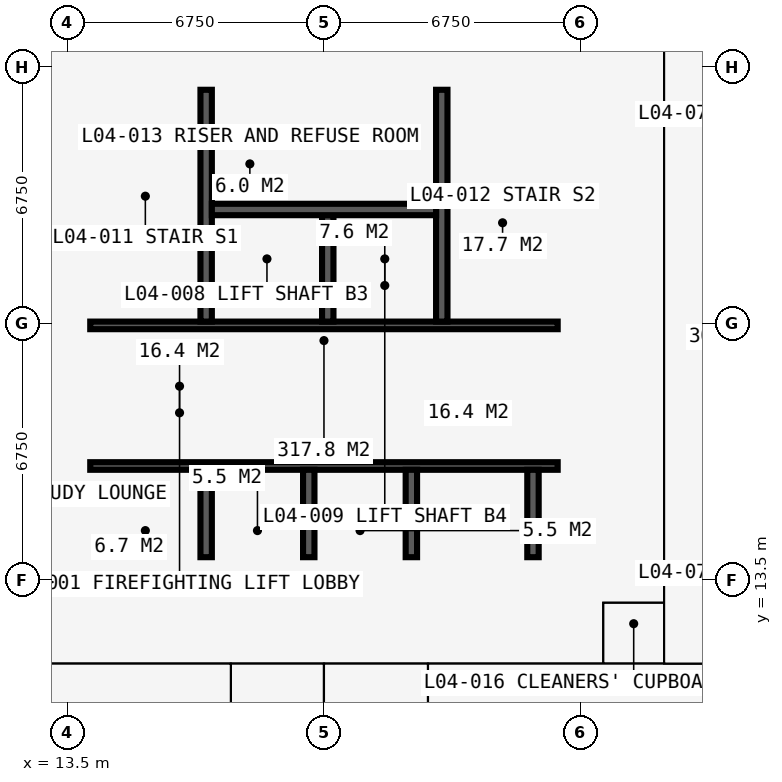
"""IFC4 building model, lengths in metres.
Left out: names, types, materials, properties, quantities, classifications, styles, units other than length and angle.
Written with IfcOpenShell. Run it as: python <this file> out.ifc"""

import sys

from ifc_helpers import new_model, si_unit, direction, frame, frame_2d, origin, place, context, subcontext, project, spatial, rectangle, extrude, element, fill, save


model = new_model("IFC4")
c1 = context("Model", 3, precision=1e-05, world=origin(), true_north=direction((0.0, 1.0)))
c2 = subcontext(c1, "Body", "Model", "MODEL_VIEW")
j1 = project(units=[si_unit("LENGTHUNIT", "METRE"), si_unit("PLANEANGLEUNIT", "RADIAN")], contexts=[c1])
p1 = place(None, origin())
s1 = spatial("IfcSite", under=j1, at=p1, CompositionType="ELEMENT")
p2 = place(p1, origin())
s2 = spatial("IfcBuilding", under=s1, at=p2, CompositionType="ELEMENT")
p3 = place(p2, frame((0.0, 0.0, 18.0)))
s3 = spatial("IfcBuildingStorey", under=s2, at=p3, CompositionType="ELEMENT", Elevation=18.0)
p4 = place(p3, frame((12.9, 13.5, 0.0), z_axis=(0.0, 0.0, 1.0), x_axis=(1.0, 0.0, 0.0)))
e1 = element("IfcWall", 1, at=p4, inside=s3, PredefinedType="SHEAR", context=c2, shape_type="SweptSolid", body=[
    extrude(rectangle(XDim=14.7, YDim=1.2, at=frame_2d((7.35, 0.0))), origin(), (0.0, 0.0, 1.0), 3.6),
])
p5 = place(p3, frame((27.0, 14.1, 0.0), z_axis=(0.0, 0.0, 1.0), x_axis=(0.0, 1.0, 0.0)))
e2 = element("IfcWall", 2, at=p5, inside=s3, PredefinedType="SHEAR", context=c2, shape_type="SweptSolid", body=[
    extrude(rectangle(XDim=12.3, YDim=1.2, at=frame_2d((6.15, 0.0))), origin(), (0.0, 0.0, 1.0), 3.6),
])
p6 = place(p5, frame((3.65, 0.0, 0.0)))
e3 = element("IfcOpeningElement", 3, at=p6, cuts=e2, PredefinedType="OPENING", context=c2, shape_type="SweptSolid", body=[
    extrude(rectangle(XDim=1.2, YDim=2.2, at=frame_2d((0.6, 1.1))), frame((0.0, 0.61, 0.0), z_axis=(0.0, -1.0, 0.0), x_axis=(1.0, 0.0, 0.0)), (0.0, 0.0, 1.0), 1.22),
])
p7 = place(p3, frame((27.6, 27.0, 0.0), z_axis=(0.0, 0.0, 1.0), x_axis=(-1.0, 0.0, 0.0)))
e4 = element("IfcWall", 4, at=p7, inside=s3, PredefinedType="SHEAR", context=c2, shape_type="SweptSolid", body=[
    extrude(rectangle(XDim=14.7, YDim=1.2, at=frame_2d((7.35, 0.0))), origin(), (0.0, 0.0, 1.0), 3.6),
])
p8 = place(p7, frame((5.225, 0.0, 0.0)))
e5 = element("IfcOpeningElement", 5, at=p8, cuts=e4, PredefinedType="OPENING", context=c2, shape_type="SweptSolid", body=[
    extrude(rectangle(XDim=0.9, YDim=2.2, at=frame_2d((0.45, 1.1))), frame((0.0, 0.61, 0.0), z_axis=(0.0, -1.0, 0.0), x_axis=(1.0, 0.0, 0.0)), (0.0, 0.0, 1.0), 1.22),
])
p9 = place(p7, frame((8.2, 0.0, 0.0)))
e6 = element("IfcOpeningElement", 6, at=p9, cuts=e4, PredefinedType="OPENING", context=c2, shape_type="SweptSolid", body=[
    extrude(rectangle(XDim=1.0, YDim=2.2, at=frame_2d((0.5, 1.1))), frame((0.0, 0.61, 0.0), z_axis=(0.0, -1.0, 0.0), x_axis=(1.0, 0.0, 0.0)), (0.0, 0.0, 1.0), 1.22),
])
p10 = place(p3, frame((13.5, 26.4, 0.0), z_axis=(0.0, 0.0, 1.0), x_axis=(0.0, -1.0, 0.0)))
e7 = element("IfcWall", 7, at=p10, inside=s3, PredefinedType="SHEAR", context=c2, shape_type="SweptSolid", body=[
    extrude(rectangle(XDim=12.3, YDim=1.2, at=frame_2d((6.15, 0.0))), origin(), (0.0, 0.0, 1.0), 3.6),
])
p11 = place(p10, frame((7.45, 0.0, 0.0)))
e8 = element("IfcOpeningElement", 8, at=p11, cuts=e7, PredefinedType="OPENING", context=c2, shape_type="SweptSolid", body=[
    extrude(rectangle(XDim=1.2, YDim=2.2, at=frame_2d((0.6, 1.1))), frame((0.0, 0.61, 0.0), z_axis=(0.0, -1.0, 0.0), x_axis=(1.0, 0.0, 0.0)), (0.0, 0.0, 1.0), 1.22),
])
p12 = place(p3, frame((14.1, 16.5, 0.0), z_axis=(0.0, 0.0, 1.0), x_axis=(1.0, 0.0, 0.0)))
e9 = element("IfcWall", 9, at=p12, inside=s3, PredefinedType="SHEAR", context=c2, shape_type="SweptSolid", body=[
    extrude(rectangle(XDim=12.3, YDim=0.2, at=frame_2d((6.15, 0.0))), origin(), (0.0, 0.0, 1.0), 3.6),
])
p13 = place(p12, frame((0.9, 0.0, 0.0)))
e10 = element("IfcOpeningElement", 10, at=p13, cuts=e9, PredefinedType="OPENING", context=c2, shape_type="SweptSolid", body=[
    extrude(rectangle(XDim=1.1, YDim=2.2, at=frame_2d((0.55, 1.1))), frame((0.0, 0.11, 0.0), z_axis=(0.0, -1.0, 0.0), x_axis=(1.0, 0.0, 0.0)), (0.0, 0.0, 1.0), 0.22),
])
p14 = place(p12, frame((9.5, 0.0, 0.0)))
e11 = element("IfcOpeningElement", 11, at=p14, cuts=e9, PredefinedType="OPENING", context=c2, shape_type="SweptSolid", body=[
    extrude(rectangle(XDim=1.1, YDim=2.2, at=frame_2d((0.55, 1.1))), frame((0.0, 0.11, 0.0), z_axis=(0.0, -1.0, 0.0), x_axis=(1.0, 0.0, 0.0)), (0.0, 0.0, 1.0), 0.22),
])
p15 = place(p3, frame((14.1, 20.2, 0.0), z_axis=(0.0, 0.0, 1.0), x_axis=(1.0, 0.0, 0.0)))
e12 = element("IfcWall", 12, at=p15, inside=s3, PredefinedType="SHEAR", context=c2, shape_type="SweptSolid", body=[
    extrude(rectangle(XDim=12.3, YDim=0.2, at=frame_2d((6.15, 0.0))), origin(), (0.0, 0.0, 1.0), 3.6),
])
p16 = place(p15, frame((0.35, 0.0, 0.0)))
e13 = element("IfcOpeningElement", 13, at=p16, cuts=e12, PredefinedType="OPENING", context=c2, shape_type="SweptSolid", body=[
    extrude(rectangle(XDim=1.1, YDim=2.2, at=frame_2d((0.55, 1.1))), frame((0.0, 0.11, 0.0), z_axis=(0.0, -1.0, 0.0), x_axis=(1.0, 0.0, 0.0)), (0.0, 0.0, 1.0), 0.22),
])
p17 = place(p15, frame((9.75, 0.0, 0.0)))
e14 = element("IfcOpeningElement", 14, at=p17, cuts=e12, PredefinedType="OPENING", context=c2, shape_type="SweptSolid", body=[
    extrude(rectangle(XDim=1.1, YDim=2.2, at=frame_2d((0.55, 1.1))), frame((0.0, 0.11, 0.0), z_axis=(0.0, -1.0, 0.0), x_axis=(1.0, 0.0, 0.0)), (0.0, 0.0, 1.0), 0.22),
])
for number, where, z_axis, x_axis in (
    (15, (17.15, 20.3, 0.0), (0.0, 0.0, 1.0), (0.0, 1.0, 0.0)),
    (16, (23.35, 20.3, 0.0), (0.0, 0.0, 1.0), (0.0, 1.0, 0.0)),
):
    element("IfcWall", number, at=place(p3, frame(where, z_axis=z_axis, x_axis=x_axis)), inside=s3, PredefinedType="SHEAR", context=c2, shape_type="SweptSolid", body=[
        extrude(rectangle(XDim=6.1, YDim=0.3, at=frame_2d((3.05, 0.0))), origin(), (0.0, 0.0, 1.0), 3.6),
    ])
p18 = place(p3, frame((20.35, 20.3, 0.0), z_axis=(0.0, 0.0, 1.0), x_axis=(0.0, 1.0, 0.0)))
e17 = element("IfcWall", 17, at=p18, inside=s3, PredefinedType="SHEAR", context=c2, shape_type="SweptSolid", body=[
    extrude(rectangle(XDim=2.8, YDim=0.3, at=frame_2d((1.4, 0.0))), origin(), (0.0, 0.0, 1.0), 3.6),
])
p19 = place(p3, frame((17.3, 23.25, 0.0), z_axis=(0.0, 0.0, 1.0), x_axis=(1.0, 0.0, 0.0)))
e18 = element("IfcWall", 18, at=p19, inside=s3, PredefinedType="SHEAR", context=c2, shape_type="SweptSolid", body=[
    extrude(rectangle(XDim=5.9, YDim=0.3, at=frame_2d((2.95, 0.0))), origin(), (0.0, 0.0, 1.0), 3.6),
])
for number, where, z_axis, x_axis in (
    (19, (17.15, 14.1, 0.0), (0.0, 0.0, 1.0), (0.0, 1.0, 0.0)),
    (20, (19.85, 14.1, 0.0), (0.0, 0.0, 1.0), (0.0, 1.0, 0.0)),
    (21, (22.55, 14.1, 0.0), (0.0, 0.0, 1.0), (0.0, 1.0, 0.0)),
    (22, (25.75, 14.1, 0.0), (0.0, 0.0, 1.0), (0.0, 1.0, 0.0)),
):
    element("IfcWall", number, at=place(p3, frame(where, z_axis=z_axis, x_axis=x_axis)), inside=s3, PredefinedType="SHEAR", context=c2, shape_type="SweptSolid", body=[
        extrude(rectangle(XDim=2.3, YDim=0.3, at=frame_2d((1.15, 0.0))), origin(), (0.0, 0.0, 1.0), 3.6),
    ])
p20 = place(p3, frame((18.875, 16.6, 0.0), z_axis=(0.0, 0.0, 1.0), x_axis=(0.0, 1.0, 0.0)))
e23 = element("IfcWall", 23, at=p20, inside=s3, PredefinedType="PARTITIONING", context=c2, shape_type="SweptSolid", body=[
    extrude(rectangle(XDim=3.5, YDim=0.15, at=frame_2d((1.75, 0.0))), origin(), (0.0, 0.0, 1.0), 3.375),
])
p21 = place(p20, frame((1.15, 0.0, 0.0)))
e24 = element("IfcOpeningElement", 24, at=p21, cuts=e23, PredefinedType="OPENING", context=c2, shape_type="SweptSolid", body=[
    extrude(rectangle(XDim=1.2, YDim=2.2, at=frame_2d((0.6, 1.1))), frame((0.0, 0.085, 0.0), z_axis=(0.0, -1.0, 0.0), x_axis=(1.0, 0.0, 0.0)), (0.0, 0.0, 1.0), 0.17),
])
p22 = place(p3, frame((21.625, 16.6, 0.0), z_axis=(0.0, 0.0, 1.0), x_axis=(0.0, 1.0, 0.0)))
e25 = element("IfcWall", 25, at=p22, inside=s3, PredefinedType="PARTITIONING", context=c2, shape_type="SweptSolid", body=[
    extrude(rectangle(XDim=3.5, YDim=0.15, at=frame_2d((1.75, 0.0))), origin(), (0.0, 0.0, 1.0), 3.375),
])
p23 = place(p22, frame((1.15, 0.0, 0.0)))
e26 = element("IfcOpeningElement", 26, at=p23, cuts=e25, PredefinedType="OPENING", context=c2, shape_type="SweptSolid", body=[
    extrude(rectangle(XDim=1.2, YDim=2.2, at=frame_2d((0.6, 1.1))), frame((0.0, 0.085, 0.0), z_axis=(0.0, -1.0, 0.0), x_axis=(1.0, 0.0, 0.0)), (0.0, 0.0, 1.0), 0.17),
])
p24 = place(p3, frame((19.375, 23.4, 0.0), z_axis=(0.0, 0.0, 1.0), x_axis=(0.0, 1.0, 0.0)))
e27 = element("IfcWall", 27, at=p24, inside=s3, PredefinedType="PARTITIONING", context=c2, shape_type="SweptSolid", body=[
    extrude(rectangle(XDim=3.0, YDim=0.15, at=frame_2d((1.5, 0.0))), origin(), (0.0, 0.0, 1.0), 3.375),
])
p25 = place(p3, frame((10.125, 11.3, 0.0), z_axis=(0.0, 0.0, 1.0), x_axis=(1.0, 0.0, 0.0)))
e28 = element("IfcWall", 28, at=p25, inside=s3, PredefinedType="PARTITIONING", context=c2, shape_type="SweptSolid", body=[
    extrude(rectangle(XDim=20.675, YDim=0.15, at=frame_2d((10.337, 0.0))), origin(), (0.0, 0.0, 1.0), 3.375),
])
p26 = place(p25, frame((8.375, 0.0, 0.0)))
e29 = element("IfcOpeningElement", 29, at=p26, cuts=e28, PredefinedType="OPENING", context=c2, shape_type="SweptSolid", body=[
    extrude(rectangle(XDim=1.0, YDim=2.2, at=frame_2d((0.5, 1.1))), frame((0.0, 0.085, 0.0), z_axis=(0.0, -1.0, 0.0), x_axis=(1.0, 0.0, 0.0)), (0.0, 0.0, 1.0), 0.17),
])
p27 = place(p25, frame((10.975, 0.0, 0.0)))
e30 = element("IfcOpeningElement", 30, at=p27, cuts=e28, PredefinedType="OPENING", context=c2, shape_type="SweptSolid", body=[
    extrude(rectangle(XDim=1.0, YDim=2.2, at=frame_2d((0.5, 1.1))), frame((0.0, 0.085, 0.0), z_axis=(0.0, -1.0, 0.0), x_axis=(1.0, 0.0, 0.0)), (0.0, 0.0, 1.0), 0.17),
])
p28 = place(p25, frame((3.925, 0.0, 0.0)))
e31 = element("IfcOpeningElement", 31, at=p28, cuts=e28, PredefinedType="OPENING", context=c2, shape_type="SweptSolid", body=[
    extrude(rectangle(XDim=0.95, YDim=2.2, at=frame_2d((0.475, 1.1))), frame((0.0, 0.085, 0.0), z_axis=(0.0, -1.0, 0.0), x_axis=(1.0, 0.0, 0.0)), (0.0, 0.0, 1.0), 0.17),
])
p29 = place(p3, frame((17.8, 5.65, 0.0), z_axis=(0.0, 0.0, 1.0), x_axis=(0.0, 1.0, 0.0)))
e32 = element("IfcWall", 32, at=p29, inside=s3, PredefinedType="PARTITIONING", context=c2, shape_type="SweptSolid", body=[
    extrude(rectangle(XDim=5.65, YDim=0.15, at=frame_2d((2.825, 0.0))), origin(), (0.0, 0.0, 1.0), 3.375),
])
p30 = place(p3, frame((20.25, -0.734, 0.0), z_axis=(0.0, 0.0, 1.0), x_axis=(0.0, 1.0, 0.0)))
e33 = element("IfcWall", 33, at=p30, inside=s3, PredefinedType="PARTITIONING", context=c2, shape_type="SweptSolid", body=[
    extrude(rectangle(XDim=12.034, YDim=0.15, at=frame_2d((6.017, 0.0))), origin(), (0.0, 0.0, 1.0), 2.61),
])
p31 = place(p3, frame((22.988, 5.65, 0.0), z_axis=(0.0, 0.0, 1.0), x_axis=(0.0, 1.0, 0.0)))
e34 = element("IfcWall", 34, at=p31, inside=s3, PredefinedType="PARTITIONING", context=c2, shape_type="SweptSolid", body=[
    extrude(rectangle(XDim=5.65, YDim=0.15, at=frame_2d((2.825, 0.0))), origin(), (0.0, 0.0, 1.0), 3.375),
])
p32 = place(p3, frame((27.6, 11.3, 0.0), z_axis=(0.0, 0.0, 1.0), x_axis=(0.0, 1.0, 0.0)))
e35 = element("IfcWall", 35, at=p32, inside=s3, PredefinedType="PARTITIONING", context=c2, shape_type="SweptSolid", body=[
    extrude(rectangle(XDim=1.6, YDim=0.15, at=frame_2d((0.8, 0.0))), origin(), (0.0, 0.0, 1.0), 3.375),
])
p33 = place(p32, frame((0.3, 0.0, 0.0)))
e36 = element("IfcOpeningElement", 36, at=p33, cuts=e35, PredefinedType="OPENING", context=c2, shape_type="SweptSolid", body=[
    extrude(rectangle(XDim=0.95, YDim=2.2, at=frame_2d((0.475, 1.1))), frame((0.0, 0.085, 0.0), z_axis=(0.0, -1.0, 0.0), x_axis=(1.0, 0.0, 0.0)), (0.0, 0.0, 1.0), 0.17),
])
p34 = place(p3, frame((27.6, 12.9, 0.0), z_axis=(0.0, 0.0, 1.0), x_axis=(1.0, 0.0, 0.0)))
e37 = element("IfcWall", 37, at=p34, inside=s3, PredefinedType="PARTITIONING", context=c2, shape_type="SweptSolid", body=[
    extrude(rectangle(XDim=1.6, YDim=0.15, at=frame_2d((0.8, 0.0))), origin(), (0.0, 0.0, 1.0), 2.877),
])
p35 = place(p3, frame((29.2, 11.3, 0.0), z_axis=(0.0, 0.0, 1.0), x_axis=(0.0, 1.0, 0.0)))
e38 = element("IfcWall", 38, at=p35, inside=s3, PredefinedType="PARTITIONING", context=c2, shape_type="SweptSolid", body=[
    extrude(rectangle(XDim=17.9, YDim=0.2, at=frame_2d((8.95, 0.0))), origin(), (0.0, 0.0, 1.0), 3.375),
])
p36 = place(p35, frame((8.35, 0.0, 0.0)))
e39 = element("IfcOpeningElement", 39, at=p36, cuts=e38, PredefinedType="OPENING", context=c2, shape_type="SweptSolid", body=[
    extrude(rectangle(XDim=1.2, YDim=2.2, at=frame_2d((0.6, 1.1))), frame((0.0, 0.11, 0.0), z_axis=(0.0, -1.0, 0.0), x_axis=(1.0, 0.0, 0.0)), (0.0, 0.0, 1.0), 0.22),
])
p37 = place(p3, frame((29.2, 25.7, 0.0), z_axis=(0.0, 0.0, 1.0), x_axis=(1.0, 0.0, 0.0)))
e40 = element("IfcWall", 40, at=p37, inside=s3, PredefinedType="SHEAR", context=c2, shape_type="SweptSolid", body=[
    extrude(rectangle(XDim=3.45, YDim=0.1, at=frame_2d((1.725, 0.0))), origin(), (0.0, 0.0, 1.0), 3.375),
])
p38 = place(p13, origin())
e41 = element("IfcDoor", 41, at=p38, inside=s3, OperationType="DOUBLE_DOOR_SLIDING", PredefinedType="DOOR", context=c2, shape_type="SweptSolid", body=[
    extrude(rectangle(XDim=1.1, YDim=2.2, at=frame_2d((0.55, 1.1))), frame((0.0, 0.025, 0.0), z_axis=(0.0, -1.0, 0.0), x_axis=(1.0, 0.0, 0.0)), (0.0, 0.0, 1.0), 0.05),
])
fill(e10, e41)
p39 = place(p14, origin())
e42 = element("IfcDoor", 42, at=p39, inside=s3, OperationType="DOUBLE_DOOR_SLIDING", PredefinedType="DOOR", context=c2, shape_type="SweptSolid", body=[
    extrude(rectangle(XDim=1.1, YDim=2.2, at=frame_2d((0.55, 1.1))), frame((0.0, 0.025, 0.0), z_axis=(0.0, -1.0, 0.0), x_axis=(1.0, 0.0, 0.0)), (0.0, 0.0, 1.0), 0.05),
])
fill(e11, e42)
p40 = place(p11, origin())
e43 = element("IfcDoor", 43, at=p40, inside=s3, OperationType="DOUBLE_DOOR_SINGLE_SWING", PredefinedType="DOOR", context=c2, shape_type="SweptSolid", body=[
    extrude(rectangle(XDim=1.2, YDim=2.2, at=frame_2d((0.6, 1.1))), frame((0.0, 0.025, 0.0), z_axis=(0.0, -1.0, 0.0), x_axis=(1.0, 0.0, 0.0)), (0.0, 0.0, 1.0), 0.05),
])
fill(e8, e43)
p41 = place(p6, origin())
e44 = element("IfcDoor", 44, at=p41, inside=s3, OperationType="DOUBLE_DOOR_SINGLE_SWING", PredefinedType="DOOR", context=c2, shape_type="SweptSolid", body=[
    extrude(rectangle(XDim=1.2, YDim=2.2, at=frame_2d((0.6, 1.1))), frame((0.0, 0.025, 0.0), z_axis=(0.0, -1.0, 0.0), x_axis=(1.0, 0.0, 0.0)), (0.0, 0.0, 1.0), 0.05),
])
fill(e3, e44)
p42 = place(p21, origin())
e45 = element("IfcDoor", 45, at=p42, inside=s3, OperationType="DOUBLE_DOOR_SINGLE_SWING", PredefinedType="DOOR", context=c2, shape_type="SweptSolid", body=[
    extrude(rectangle(XDim=1.2, YDim=2.2, at=frame_2d((0.6, 1.1))), frame((0.0, 0.025, 0.0), z_axis=(0.0, -1.0, 0.0), x_axis=(1.0, 0.0, 0.0)), (0.0, 0.0, 1.0), 0.05),
])
fill(e24, e45)
p43 = place(p23, origin())
e46 = element("IfcDoor", 46, at=p43, inside=s3, OperationType="DOUBLE_DOOR_SINGLE_SWING", PredefinedType="DOOR", context=c2, shape_type="SweptSolid", body=[
    extrude(rectangle(XDim=1.2, YDim=2.2, at=frame_2d((0.6, 1.1))), frame((0.0, 0.025, 0.0), z_axis=(0.0, -1.0, 0.0), x_axis=(1.0, 0.0, 0.0)), (0.0, 0.0, 1.0), 0.05),
])
fill(e26, e46)
p44 = place(p8, origin())
e47 = element("IfcDoor", 47, at=p44, inside=s3, OperationType="SINGLE_SWING_LEFT", PredefinedType="DOOR", context=c2, shape_type="SweptSolid", body=[
    extrude(rectangle(XDim=0.9, YDim=2.2, at=frame_2d((0.45, 1.1))), frame((0.0, 0.4, 0.0), z_axis=(0.0, -1.0, 0.0), x_axis=(1.0, 0.0, 0.0)), (0.0, 0.0, 1.0), 0.8),
])
fill(e5, e47)
p45 = place(p9, origin())
e48 = element("IfcDoor", 48, at=p45, inside=s3, OperationType="SINGLE_SWING_LEFT", PredefinedType="DOOR", context=c2, shape_type="SweptSolid", body=[
    extrude(rectangle(XDim=1.0, YDim=2.2, at=frame_2d((0.5, 1.1))), frame((0.0, 0.025, 0.0), z_axis=(0.0, -1.0, 0.0), x_axis=(1.0, 0.0, 0.0)), (0.0, 0.0, 1.0), 0.05),
])
fill(e6, e48)
p46 = place(p16, origin())
e49 = element("IfcDoor", 49, at=p46, inside=s3, OperationType="SINGLE_SWING_LEFT", PredefinedType="DOOR", context=c2, shape_type="SweptSolid", body=[
    extrude(rectangle(XDim=1.1, YDim=2.2, at=frame_2d((0.55, 1.1))), frame((0.0, 0.025, 0.0), z_axis=(0.0, -1.0, 0.0), x_axis=(1.0, 0.0, 0.0)), (0.0, 0.0, 1.0), 0.05),
])
fill(e13, e49)
p47 = place(p17, origin())
e50 = element("IfcDoor", 50, at=p47, inside=s3, OperationType="SINGLE_SWING_LEFT", PredefinedType="DOOR", context=c2, shape_type="SweptSolid", body=[
    extrude(rectangle(XDim=1.1, YDim=2.2, at=frame_2d((0.55, 1.1))), frame((0.0, 0.025, 0.0), z_axis=(0.0, -1.0, 0.0), x_axis=(1.0, 0.0, 0.0)), (0.0, 0.0, 1.0), 0.05),
])
fill(e14, e50)
p48 = place(p33, origin())
e51 = element("IfcDoor", 51, at=p48, inside=s3, OperationType="SINGLE_SWING_LEFT", PredefinedType="DOOR", context=c2, shape_type="SweptSolid", body=[
    extrude(rectangle(XDim=0.95, YDim=2.2, at=frame_2d((0.475, 1.1))), frame((0.0, 0.025, 0.0), z_axis=(0.0, -1.0, 0.0), x_axis=(1.0, 0.0, 0.0)), (0.0, 0.0, 1.0), 0.05),
])
fill(e36, e51)
p49 = place(p26, origin())
e52 = element("IfcDoor", 52, at=p49, inside=s3, OperationType="SINGLE_SWING_LEFT", PredefinedType="DOOR", context=c2, shape_type="SweptSolid", body=[
    extrude(rectangle(XDim=1.0, YDim=2.2, at=frame_2d((0.5, 1.1))), frame((0.0, 0.025, 0.0), z_axis=(0.0, -1.0, 0.0), x_axis=(1.0, 0.0, 0.0)), (0.0, 0.0, 1.0), 0.05),
])
fill(e29, e52)
p50 = place(p27, origin())
e53 = element("IfcDoor", 53, at=p50, inside=s3, OperationType="SINGLE_SWING_LEFT", PredefinedType="DOOR", context=c2, shape_type="SweptSolid", body=[
    extrude(rectangle(XDim=1.0, YDim=2.2, at=frame_2d((0.5, 1.1))), frame((0.0, 0.025, 0.0), z_axis=(0.0, -1.0, 0.0), x_axis=(1.0, 0.0, 0.0)), (0.0, 0.0, 1.0), 0.05),
])
fill(e30, e53)
p51 = place(p28, origin())
e54 = element("IfcDoor", 54, at=p51, inside=s3, OperationType="SINGLE_SWING_LEFT", PredefinedType="DOOR", context=c2, shape_type="SweptSolid", body=[
    extrude(rectangle(XDim=0.95, YDim=2.2, at=frame_2d((0.475, 1.1))), frame((0.0, 0.025, 0.0), z_axis=(0.0, -1.0, 0.0), x_axis=(1.0, 0.0, 0.0)), (0.0, 0.0, 1.0), 0.05),
])
fill(e31, e54)
p52 = place(p36, origin())
e55 = element("IfcDoor", 55, at=p52, inside=s3, OperationType="DOUBLE_DOOR_SINGLE_SWING", PredefinedType="DOOR", context=c2, shape_type="SweptSolid", body=[
    extrude(rectangle(XDim=1.2, YDim=2.2, at=frame_2d((0.6, 1.1))), frame((0.0, 0.025, 0.0), z_axis=(0.0, -1.0, 0.0), x_axis=(1.0, 0.0, 0.0)), (0.0, 0.0, 1.0), 0.05),
])
fill(e39, e55)
save(model, sys.argv[1])
